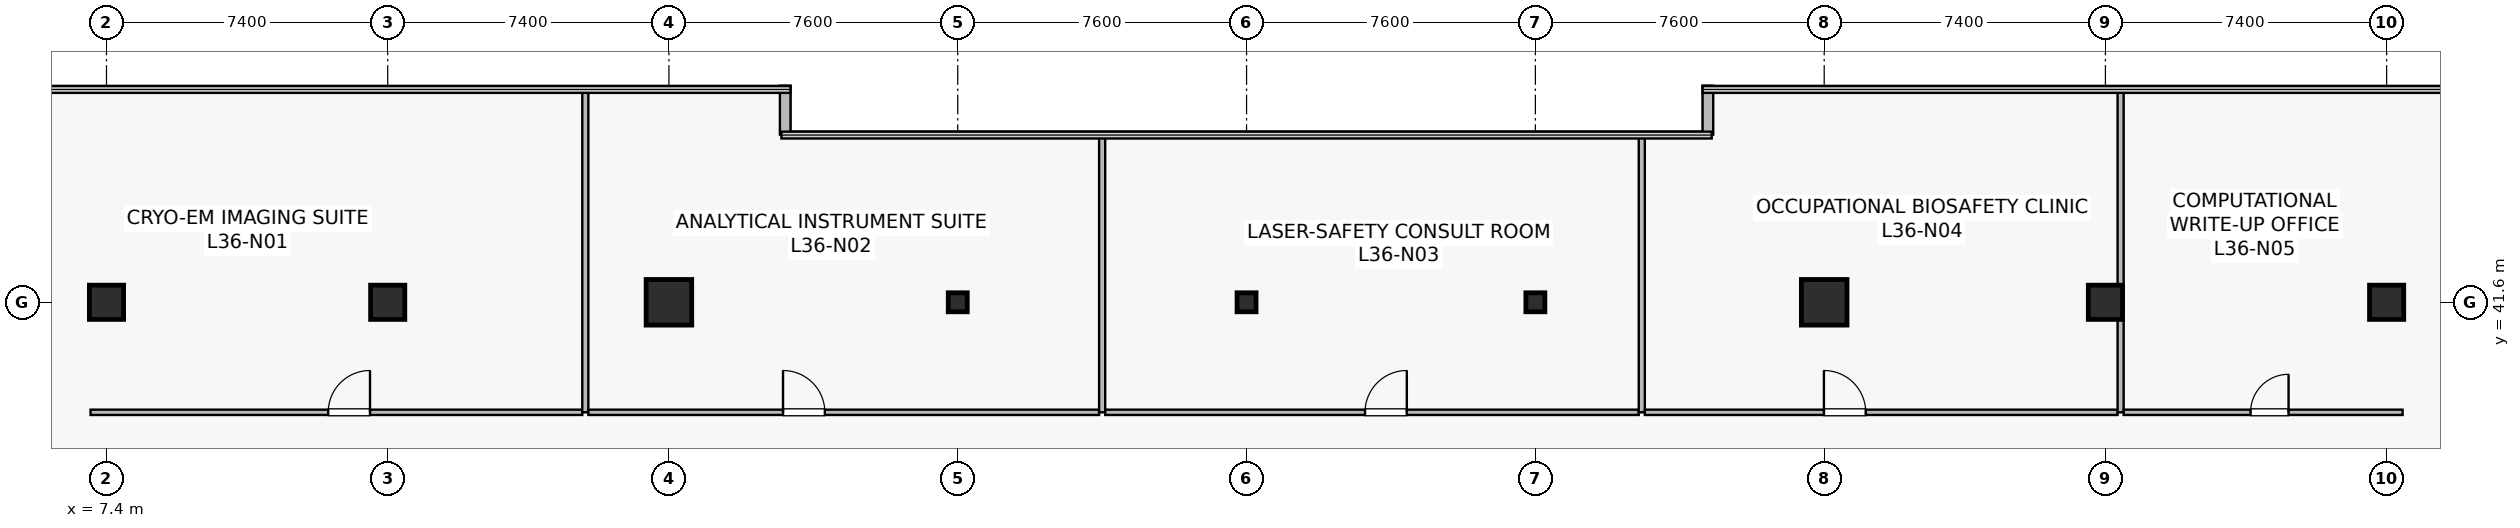
"""IFC4 building model, lengths in metres.
Left out: names, types, materials, properties, quantities, classifications, styles, units other than length and angle.
Written with IfcOpenShell. Run it as: python <this file> out.ifc"""

import sys

from ifc_helpers import new_model, si_unit, direction, frame, frame_2d, origin, origin_2d, place, context, subcontext, project, spatial, rectangle, hollow_rectangle, extrude, source, transform, mapped, element, fill, save


model = new_model("IFC4")
c1 = context("Model", 3, precision=1e-05, world=origin(), true_north=direction((0.0, 1.0)))
c2 = subcontext(c1, "Body", "Model", "MODEL_VIEW")
j1 = project(units=[si_unit("LENGTHUNIT", "METRE"), si_unit("PLANEANGLEUNIT", "RADIAN")], contexts=[c1])
p1 = place(None, origin())
s1 = spatial("IfcSite", under=j1, at=p1, CompositionType="ELEMENT")
p2 = place(p1, origin())
s2 = spatial("IfcBuilding", under=s1, at=p2, CompositionType="ELEMENT")
p3 = place(p2, frame((0.0, 0.0, 150.2)))
s3 = spatial("IfcBuildingStorey", under=s2, at=p3, CompositionType="ELEMENT", Elevation=150.2)
m1 = source(origin(), c2, "Body", "SweptSolid", [
    extrude(rectangle(XDim=0.9, YDim=0.9, at=origin_2d()), origin(), (0.0, 0.0, 1.0), 4.1),
])
p4 = place(p3, frame((14.8, 41.6, 0.0), z_axis=(0.0, 0.0, 1.0), x_axis=(1.0, 0.0, 0.0)))
e1 = element("IfcColumn", 1, at=p4, inside=s3, PredefinedType="COLUMN", context=c2, shape_type="MappedRepresentation", body=[
    mapped(m1, transform((0.0, 0.0, 0.0), scale=1.0)),
])
m2 = source(origin(), c2, "Body", "SweptSolid", [
    extrude(rectangle(XDim=1.2, YDim=1.2, at=origin_2d()), origin(), (0.0, 0.0, 1.0), 4.1),
])
for number, where, z_axis, x_axis in (
    (2, (22.2, 41.6, 0.0), (0.0, 0.0, 1.0), (1.0, 0.0, 0.0)),
    (3, (52.6, 41.6, 0.0), (0.0, 0.0, 1.0), (1.0, 0.0, 0.0)),
):
    element("IfcColumn", number, at=place(p3, frame(where, z_axis=z_axis, x_axis=x_axis)), inside=s3, PredefinedType="COLUMN", context=c2, shape_type="MappedRepresentation", body=[
        mapped(m2, transform((0.0, 0.0, 0.0), scale=1.0)),
    ])
for number, where, z_axis, x_axis in (
    (4, (60.0, 41.6, 0.0), (0.0, 0.0, 1.0), (1.0, 0.0, 0.0)),
    (5, (7.4, 41.6, 0.0), (0.0, 0.0, 1.0), (1.0, 0.0, 0.0)),
    (6, (67.4, 41.6, 0.0), (0.0, 0.0, 1.0), (1.0, 0.0, 0.0)),
):
    element("IfcColumn", number, at=place(p3, frame(where, z_axis=z_axis, x_axis=x_axis)), inside=s3, PredefinedType="COLUMN", context=c2, shape_type="MappedRepresentation", body=[
        mapped(m1, transform((0.0, 0.0, 0.0), scale=1.0)),
    ])
m3 = source(origin(), c2, "Body", "SweptSolid", [
    extrude(hollow_rectangle(XDim=0.5, YDim=0.5, WallThickness=0.022, at=origin_2d()), origin(), (0.0, 0.0, 1.0), 4.1),
])
for number, where, z_axis, x_axis in (
    (7, (29.8, 41.6, 0.0), (0.0, 0.0, 1.0), (1.0, 0.0, 0.0)),
    (8, (37.4, 41.6, 0.0), (0.0, 0.0, 1.0), (1.0, 0.0, 0.0)),
    (9, (45.0, 41.6, 0.0), (0.0, 0.0, 1.0), (1.0, 0.0, 0.0)),
):
    element("IfcColumn", number, at=place(p3, frame(where, z_axis=z_axis, x_axis=x_axis)), inside=s3, PredefinedType="COLUMN", context=c2, shape_type="MappedRepresentation", body=[
        mapped(m3, transform((0.0, 0.0, 0.0), scale=1.0)),
    ])
for number, where, z_axis, x_axis in (
    (10, (49.54, 47.3, 0.0), (0.0, 0.0, 1.0), (0.0, -1.0, 0.0)),
    (11, (25.26, 46.012, 0.0), (0.0, 0.0, 1.0), (0.0, 1.0, 0.0)),
):
    element("IfcWall", number, at=place(p3, frame(where, z_axis=z_axis, x_axis=x_axis)), inside=s3, PredefinedType="STANDARD", context=c2, shape_type="SweptSolid", body=[
        extrude(rectangle(XDim=1.288, YDim=0.28, at=frame_2d((0.644, 0.0))), origin(), (0.0, 0.0, 1.0), 3.79),
    ])
p5 = place(p3, frame((6.98, 38.705, 0.0), z_axis=(0.0, 0.0, 1.0), x_axis=(1.0, 0.0, 0.0)))
e12 = element("IfcWall", 12, at=p5, inside=s3, PredefinedType="PARTITIONING", context=c2, shape_type="SweptSolid", body=[
    extrude(rectangle(XDim=12.94, YDim=0.14, at=frame_2d((6.47, 0.0))), origin(), (0.0, 0.0, 1.0), 3.187),
])
p6 = place(p5, frame((6.254, 0.0, 0.0)))
e13 = element("IfcOpeningElement", 13, at=p6, cuts=e12, PredefinedType="OPENING", context=c2, shape_type="SweptSolid", body=[
    extrude(rectangle(XDim=1.1, YDim=2.18, at=frame_2d((0.55, 1.09))), frame((0.0, 0.08, 0.0), z_axis=(0.0, -1.0, 0.0), x_axis=(1.0, 0.0, 0.0)), (0.0, 0.0, 1.0), 0.16),
])
p7 = place(p3, frame((20.0, 38.705, 0.0), z_axis=(0.0, 0.0, 1.0), x_axis=(0.0, 1.0, 0.0)))
e14 = element("IfcWall", 14, at=p7, inside=s3, PredefinedType="PARTITIONING", context=c2, shape_type="SweptSolid", body=[
    extrude(rectangle(XDim=8.485, YDim=0.16, at=frame_2d((4.242, 0.0))), origin(), (0.0, 0.0, 1.0), 3.075),
])
p8 = place(p3, frame((20.08, 38.705, 0.0), z_axis=(0.0, 0.0, 1.0), x_axis=(1.0, 0.0, 0.0)))
e15 = element("IfcWall", 15, at=p8, inside=s3, PredefinedType="PARTITIONING", context=c2, shape_type="SweptSolid", body=[
    extrude(rectangle(XDim=13.44, YDim=0.14, at=frame_2d((6.72, 0.0))), origin(), (0.0, 0.0, 1.0), 3.187),
])
p9 = place(p8, frame((5.122, 0.0, 0.0)))
e16 = element("IfcOpeningElement", 16, at=p9, cuts=e15, PredefinedType="OPENING", context=c2, shape_type="SweptSolid", body=[
    extrude(rectangle(XDim=1.1, YDim=2.18, at=frame_2d((0.55, 1.09))), frame((0.0, 0.08, 0.0), z_axis=(0.0, -1.0, 0.0), x_axis=(1.0, 0.0, 0.0)), (0.0, 0.0, 1.0), 0.16),
])
p10 = place(p3, frame((33.6, 38.705, 0.0), z_axis=(0.0, 0.0, 1.0), x_axis=(0.0, 1.0, 0.0)))
e17 = element("IfcWall", 17, at=p10, inside=s3, PredefinedType="PARTITIONING", context=c2, shape_type="SweptSolid", body=[
    extrude(rectangle(XDim=7.285, YDim=0.16, at=frame_2d((3.643, 0.0))), origin(), (0.0, 0.0, 1.0), 3.075),
])
p11 = place(p3, frame((33.68, 38.705, 0.0), z_axis=(0.0, 0.0, 1.0), x_axis=(1.0, 0.0, 0.0)))
e18 = element("IfcWall", 18, at=p11, inside=s3, PredefinedType="PARTITIONING", context=c2, shape_type="SweptSolid", body=[
    extrude(rectangle(XDim=14.04, YDim=0.14, at=frame_2d((7.02, 0.0))), origin(), (0.0, 0.0, 1.0), 3.187),
])
p12 = place(p11, frame((6.837, 0.0, 0.0)))
e19 = element("IfcOpeningElement", 19, at=p12, cuts=e18, PredefinedType="OPENING", context=c2, shape_type="SweptSolid", body=[
    extrude(rectangle(XDim=1.1, YDim=2.18, at=frame_2d((0.55, 1.09))), frame((0.0, 0.08, 0.0), z_axis=(0.0, -1.0, 0.0), x_axis=(1.0, 0.0, 0.0)), (0.0, 0.0, 1.0), 0.16),
])
p13 = place(p3, frame((47.8, 38.705, 0.0), z_axis=(0.0, 0.0, 1.0), x_axis=(0.0, 1.0, 0.0)))
e20 = element("IfcWall", 20, at=p13, inside=s3, PredefinedType="PARTITIONING", context=c2, shape_type="SweptSolid", body=[
    extrude(rectangle(XDim=7.285, YDim=0.16, at=frame_2d((3.643, 0.0))), origin(), (0.0, 0.0, 1.0), 3.075),
])
p14 = place(p3, frame((47.88, 38.705, 0.0), z_axis=(0.0, 0.0, 1.0), x_axis=(1.0, 0.0, 0.0)))
e21 = element("IfcWall", 21, at=p14, inside=s3, PredefinedType="PARTITIONING", context=c2, shape_type="SweptSolid", body=[
    extrude(rectangle(XDim=12.44, YDim=0.14, at=frame_2d((6.22, 0.0))), origin(), (0.0, 0.0, 1.0), 3.187),
])
p15 = place(p14, frame((4.712, 0.0, 0.0)))
e22 = element("IfcOpeningElement", 22, at=p15, cuts=e21, PredefinedType="OPENING", context=c2, shape_type="SweptSolid", body=[
    extrude(rectangle(XDim=1.1, YDim=2.18, at=frame_2d((0.55, 1.09))), frame((0.0, 0.08, 0.0), z_axis=(0.0, -1.0, 0.0), x_axis=(1.0, 0.0, 0.0)), (0.0, 0.0, 1.0), 0.16),
])
p16 = place(p3, frame((60.4, 38.705, 0.0), z_axis=(0.0, 0.0, 1.0), x_axis=(0.0, 1.0, 0.0)))
e23 = element("IfcWall", 23, at=p16, inside=s3, PredefinedType="PARTITIONING", context=c2, shape_type="SweptSolid", body=[
    extrude(rectangle(XDim=8.485, YDim=0.16, at=frame_2d((4.242, 0.0))), origin(), (0.0, 0.0, 1.0), 3.075),
])
p17 = place(p3, frame((60.48, 38.705, 0.0), z_axis=(0.0, 0.0, 1.0), x_axis=(1.0, 0.0, 0.0)))
e24 = element("IfcWall", 24, at=p17, inside=s3, PredefinedType="PARTITIONING", context=c2, shape_type="SweptSolid", body=[
    extrude(rectangle(XDim=7.34, YDim=0.14, at=frame_2d((3.67, 0.0))), origin(), (0.0, 0.0, 1.0), 3.275),
])
p18 = place(p17, frame((3.339, 0.0, 0.0)))
e25 = element("IfcOpeningElement", 25, at=p18, cuts=e24, PredefinedType="OPENING", context=c2, shape_type="SweptSolid", body=[
    extrude(rectangle(XDim=1.0, YDim=2.15, at=frame_2d((0.5, 1.075))), frame((0.0, 0.08, 0.0), z_axis=(0.0, -1.0, 0.0), x_axis=(1.0, 0.0, 0.0)), (0.0, 0.0, 1.0), 0.16),
])
m4 = source(origin(), c2, "Body", "SweptSolid", [
    extrude(rectangle(XDim=1.1, YDim=2.18, at=frame_2d((0.55, 1.09))), frame((0.0, 0.025, 0.0), z_axis=(0.0, -1.0, 0.0), x_axis=(1.0, 0.0, 0.0)), (0.0, 0.0, 1.0), 0.05),
])
p19 = place(p6, origin())
e26 = element("IfcDoor", 26, at=p19, inside=s3, OperationType="SINGLE_SWING_RIGHT", PredefinedType="DOOR", context=c2, shape_type="MappedRepresentation", body=[
    mapped(m4, transform((0.0, 0.0, 0.0), scale=1.0)),
])
fill(e13, e26)
p20 = place(p9, origin())
e27 = element("IfcDoor", 27, at=p20, inside=s3, OperationType="SINGLE_SWING_LEFT", PredefinedType="DOOR", context=c2, shape_type="MappedRepresentation", body=[
    mapped(m4, transform((0.0, 0.0, 0.0), scale=1.0)),
])
fill(e16, e27)
p21 = place(p12, origin())
e28 = element("IfcDoor", 28, at=p21, inside=s3, OperationType="SINGLE_SWING_RIGHT", PredefinedType="DOOR", context=c2, shape_type="MappedRepresentation", body=[
    mapped(m4, transform((0.0, 0.0, 0.0), scale=1.0)),
])
fill(e19, e28)
p22 = place(p15, origin())
e29 = element("IfcDoor", 29, at=p22, inside=s3, OperationType="SINGLE_SWING_LEFT", PredefinedType="DOOR", context=c2, shape_type="MappedRepresentation", body=[
    mapped(m4, transform((0.0, 0.0, 0.0), scale=1.0)),
])
fill(e22, e29)
m5 = source(origin(), c2, "Body", "SweptSolid", [
    extrude(rectangle(XDim=1.0, YDim=2.15, at=frame_2d((0.5, 1.075))), frame((0.0, 0.025, 0.0), z_axis=(0.0, -1.0, 0.0), x_axis=(1.0, 0.0, 0.0)), (0.0, 0.0, 1.0), 0.05),
])
p23 = place(p18, origin())
e30 = element("IfcDoor", 30, at=p23, inside=s3, OperationType="SINGLE_SWING_RIGHT", PredefinedType="DOOR", context=c2, shape_type="MappedRepresentation", body=[
    mapped(m5, transform((0.0, 0.0, 0.0), scale=1.0)),
])
fill(e25, e30)
save(model, sys.argv[1])
